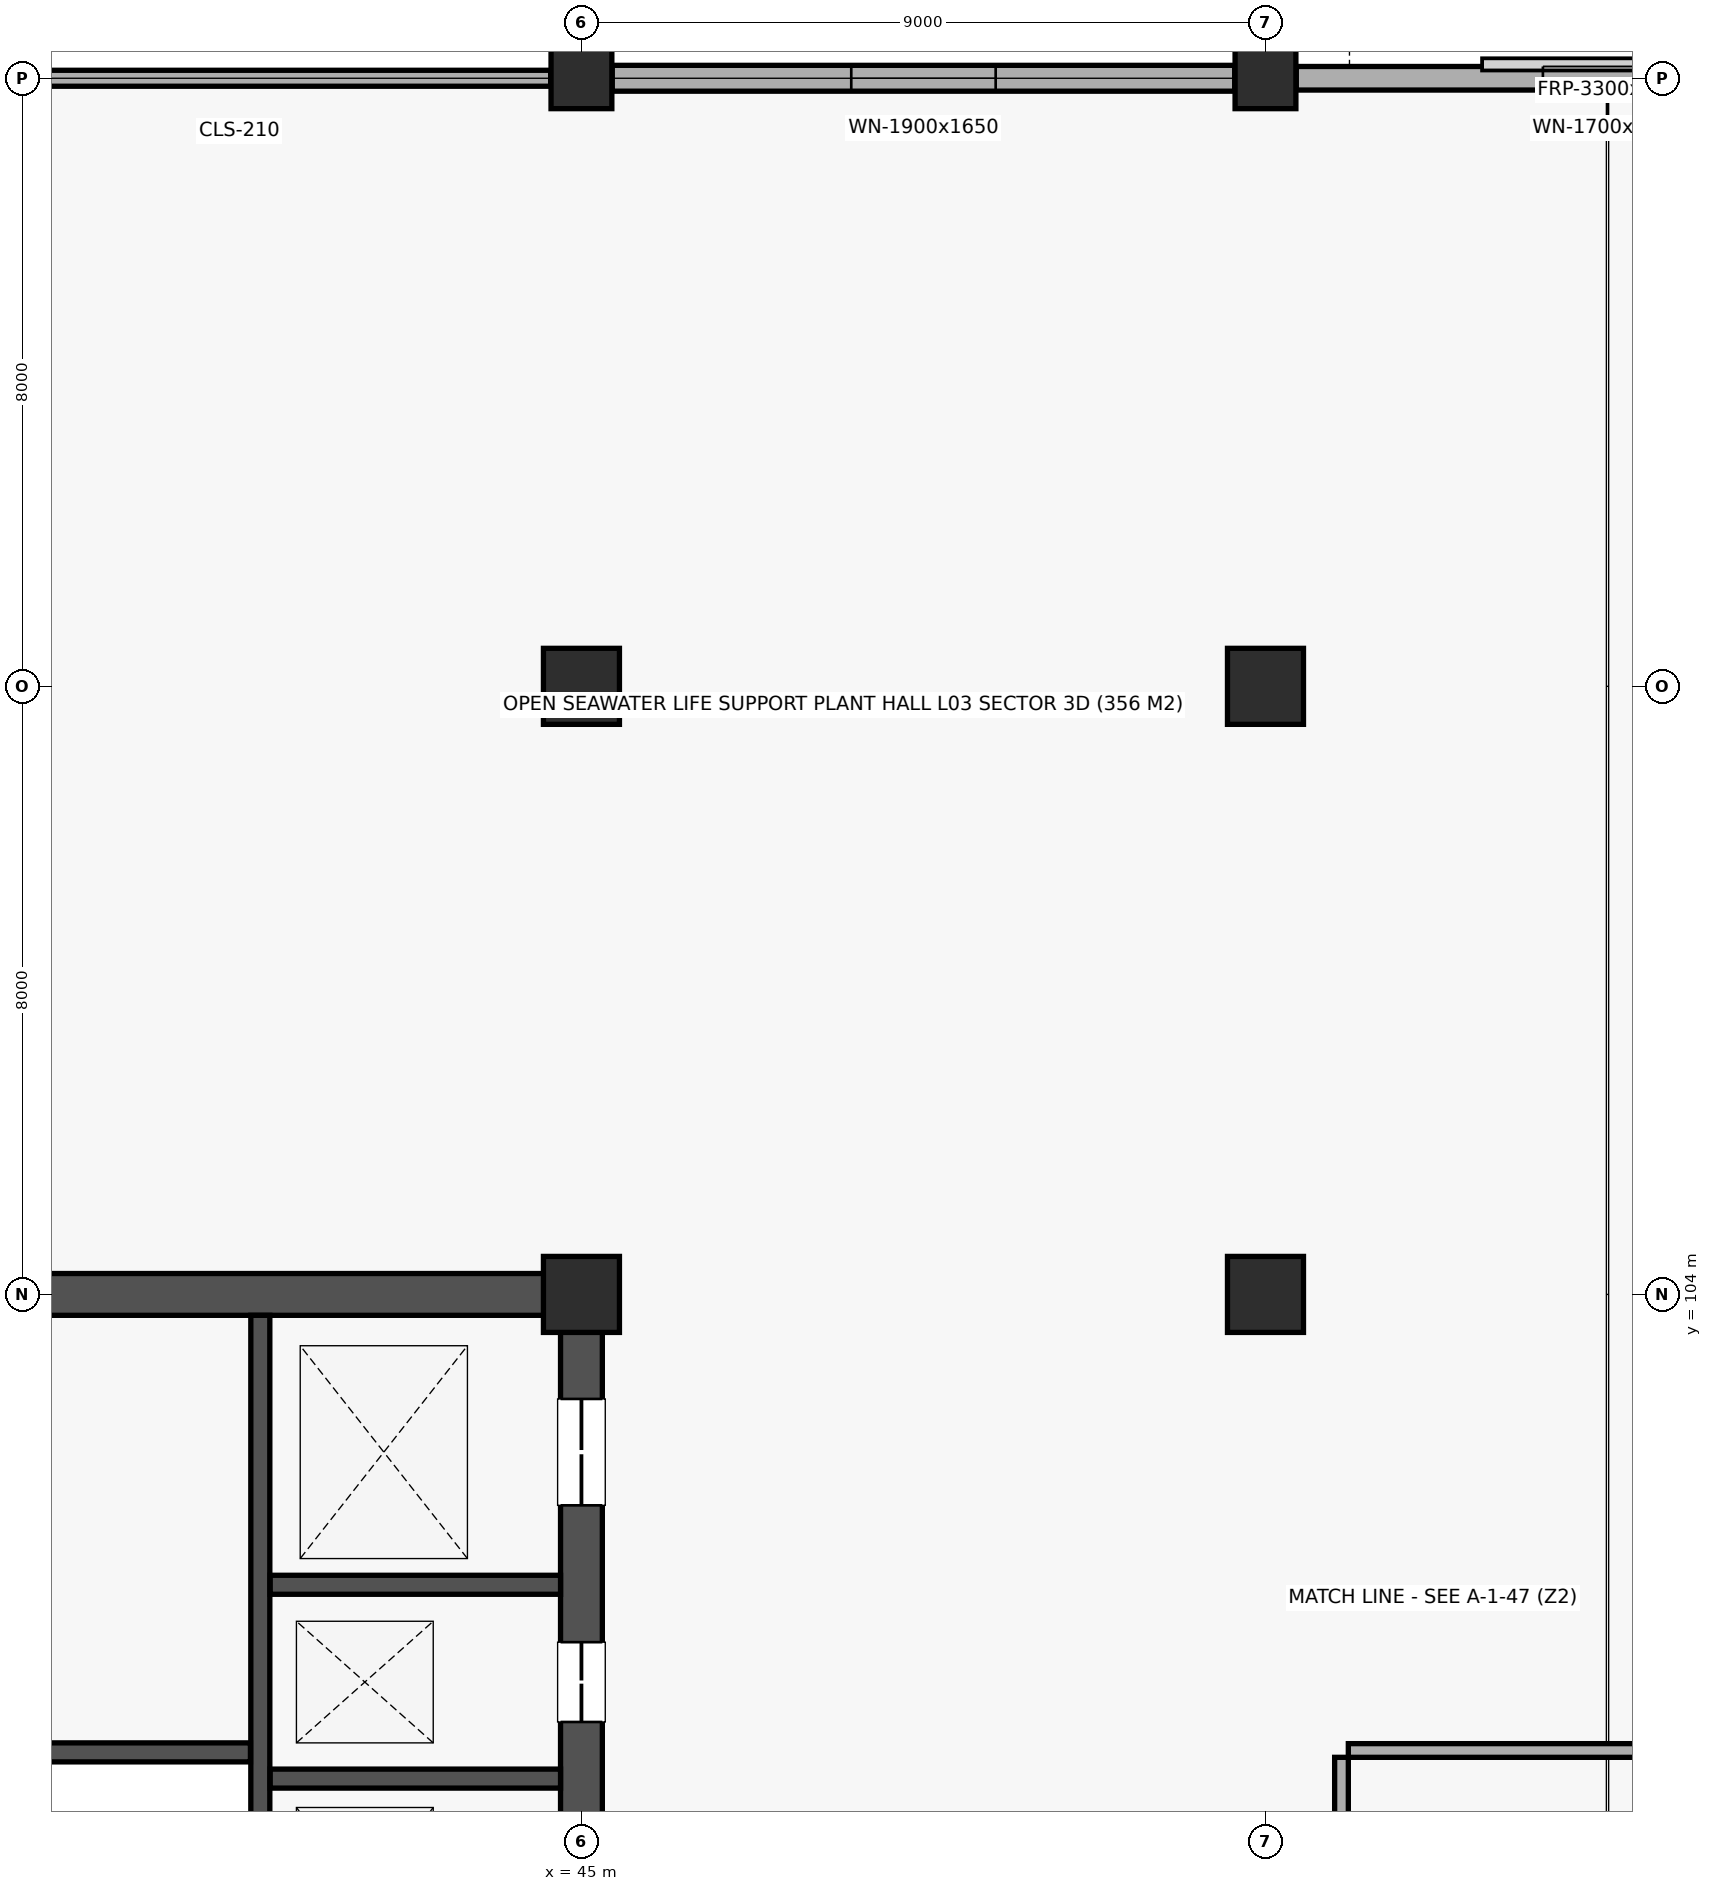
"""IFC4 building model, lengths in metres.
Left out: names, types, materials, properties, quantities, classifications, styles, units other than length and angle.
Written with IfcOpenShell. Run it as: python <this file> out.ifc"""

import sys

from ifc_helpers import new_model, si_unit, direction, frame, frame_2d, origin, origin_2d, place, context, subcontext, project, spatial, rectangle, extrude, element, fill, save


model = new_model("IFC4")
c1 = context("Model", 3, precision=1e-05, world=origin(), true_north=direction((0.0, 1.0)))
c2 = subcontext(c1, "Body", "Model", "MODEL_VIEW")
j1 = project(units=[si_unit("LENGTHUNIT", "METRE"), si_unit("PLANEANGLEUNIT", "RADIAN")], contexts=[c1])
p1 = place(None, origin())
s1 = spatial("IfcSite", under=j1, at=p1, CompositionType="ELEMENT")
p2 = place(p1, origin())
s2 = spatial("IfcBuilding", under=s1, at=p2, CompositionType="ELEMENT")
p3 = place(p2, frame((0.0, 0.0, 13.5)))
s3 = spatial("IfcBuildingStorey", under=s2, at=p3, CompositionType="ELEMENT", Elevation=13.5)
for number, where, z_axis, x_axis in (
    (1, (45.0, 104.0, 0.0), (0.0, 0.0, 1.0), (1.0, 0.0, 0.0)),
    (2, (45.0, 112.0, 0.0), (0.0, 0.0, 1.0), (1.0, 0.0, 0.0)),
):
    element("IfcColumn", number, at=place(p3, frame(where, z_axis=z_axis, x_axis=x_axis)), inside=s3, PredefinedType="COLUMN", context=c2, shape_type="SweptSolid", body=[
        extrude(rectangle(XDim=1.0, YDim=1.0, at=origin_2d()), origin(), (0.0, 0.0, 1.0), 4.5),
    ])
p4 = place(p3, frame((45.0, 120.0, 0.0), z_axis=(0.0, 0.0, 1.0), x_axis=(1.0, 0.0, 0.0)))
e3 = element("IfcColumn", 3, at=p4, inside=s3, PredefinedType="COLUMN", context=c2, shape_type="SweptSolid", body=[
    extrude(rectangle(XDim=0.8, YDim=0.8, at=origin_2d()), origin(), (0.0, 0.0, 1.0), 4.2),
])
for number, where, z_axis, x_axis in (
    (4, (54.0, 104.0, 0.0), (0.0, 0.0, 1.0), (1.0, 0.0, 0.0)),
    (5, (54.0, 112.0, 0.0), (0.0, 0.0, 1.0), (1.0, 0.0, 0.0)),
):
    element("IfcColumn", number, at=place(p3, frame(where, z_axis=z_axis, x_axis=x_axis)), inside=s3, PredefinedType="COLUMN", context=c2, shape_type="SweptSolid", body=[
        extrude(rectangle(XDim=1.0, YDim=1.0, at=origin_2d()), origin(), (0.0, 0.0, 1.0), 4.5),
    ])
p5 = place(p3, frame((54.0, 120.0, 0.0), z_axis=(0.0, 0.0, 1.0), x_axis=(1.0, 0.0, 0.0)))
e6 = element("IfcColumn", 6, at=p5, inside=s3, PredefinedType="COLUMN", context=c2, shape_type="SweptSolid", body=[
    extrude(rectangle(XDim=0.8, YDim=0.8, at=origin_2d()), origin(), (0.0, 0.0, 1.0), 4.2),
])
p6 = place(p3, frame((36.275, 104.0, 0.0), z_axis=(0.0, 0.0, 1.0), x_axis=(1.0, 0.0, 0.0)))
e7 = element("IfcWall", 7, at=p6, inside=s3, PredefinedType="SHEAR", context=c2, shape_type="SweptSolid", body=[
    extrude(rectangle(XDim=8.45, YDim=0.55, at=frame_2d((4.225, 0.0))), origin(), (0.0, 0.0, 1.0), 4.2),
])
p7 = place(p3, frame((45.0, 88.275, 0.0), z_axis=(0.0, 0.0, 1.0), x_axis=(0.0, 1.0, 0.0)))
e8 = element("IfcWall", 8, at=p7, inside=s3, PredefinedType="SHEAR", context=c2, shape_type="SweptSolid", body=[
    extrude(rectangle(XDim=15.45, YDim=0.55, at=frame_2d((7.725, 0.0))), origin(), (0.0, 0.0, 1.0), 4.2),
])
p8 = place(p7, frame((10.1, 0.0, 0.0)))
e9 = element("IfcOpeningElement", 9, at=p8, cuts=e8, PredefinedType="OPENING", context=c2, shape_type="SweptSolid", body=[
    extrude(rectangle(XDim=1.05, YDim=2.12, at=frame_2d((0.525, 1.06))), frame((0.0, 0.287, 0.0), z_axis=(0.0, -1.0, 0.0), x_axis=(1.0, 0.0, 0.0)), (0.0, 0.0, 1.0), 0.574),
])
p9 = place(p7, frame((12.95, 0.0, 0.0)))
e10 = element("IfcOpeningElement", 10, at=p9, cuts=e8, PredefinedType="OPENING", context=c2, shape_type="SweptSolid", body=[
    extrude(rectangle(XDim=1.4, YDim=2.2, at=frame_2d((0.7, 1.1))), frame((0.0, 0.287, 0.0), z_axis=(0.0, -1.0, 0.0), x_axis=(1.0, 0.0, 0.0)), (0.0, 0.0, 1.0), 0.574),
])
p10 = place(p3, frame((40.775, 88.275, 0.0), z_axis=(0.0, 0.0, 1.0), x_axis=(0.0, 1.0, 0.0)))
e11 = element("IfcWall", 11, at=p10, inside=s3, PredefinedType="SOLIDWALL", context=c2, shape_type="SweptSolid", body=[
    extrude(rectangle(XDim=15.45, YDim=0.25, at=frame_2d((7.725, 0.0))), origin(), (0.0, 0.0, 1.0), 4.2),
])
p11 = place(p10, frame((0.45, 0.0, 0.0)))
e12 = element("IfcOpeningElement", 12, at=p11, cuts=e11, PredefinedType="OPENING", context=c2, shape_type="SweptSolid", body=[
    extrude(rectangle(XDim=1.1, YDim=2.15, at=frame_2d((0.55, 1.075))), frame((0.0, 0.137, 0.0), z_axis=(0.0, -1.0, 0.0), x_axis=(1.0, 0.0, 0.0)), (0.0, 0.0, 1.0), 0.274),
])
p12 = place(p3, frame((36.275, 97.975, 0.0), z_axis=(0.0, 0.0, 1.0), x_axis=(1.0, 0.0, 0.0)))
e13 = element("IfcWall", 13, at=p12, inside=s3, PredefinedType="SOLIDWALL", context=c2, shape_type="SweptSolid", body=[
    extrude(rectangle(XDim=4.37, YDim=0.25, at=frame_2d((2.185, 0.0))), origin(), (0.0, 0.0, 1.0), 4.2),
])
for number, where, z_axis, x_axis in (
    (14, (40.905, 97.63, 0.0), (0.0, 0.0, 1.0), (1.0, 0.0, 0.0)),
    (15, (40.905, 100.18, 0.0), (0.0, 0.0, 1.0), (1.0, 0.0, 0.0)),
):
    element("IfcWall", number, at=place(p3, frame(where, z_axis=z_axis, x_axis=x_axis)), inside=s3, PredefinedType="SOLIDWALL", context=c2, shape_type="SweptSolid", body=[
        extrude(rectangle(XDim=3.82, YDim=0.25, at=frame_2d((1.91, 0.0))), origin(), (0.0, 0.0, 1.0), 4.2),
    ])
p13 = place(p3, frame((36.405, 120.0, 0.0), z_axis=(0.0, 0.0, 1.0), x_axis=(1.0, 0.0, 0.0)))
e16 = element("IfcWall", 16, at=p13, inside=s3, PredefinedType="ELEMENTEDWALL", context=c2, shape_type="SweptSolid", body=[
    extrude(rectangle(XDim=8.19, YDim=0.21, at=frame_2d((4.095, 0.0))), origin(), (0.0, 0.0, 1.0), 3.48),
])
p14 = place(p3, frame((45.405, 120.0, 0.0), z_axis=(0.0, 0.0, 1.0), x_axis=(1.0, 0.0, 0.0)))
e17 = element("IfcWall", 17, at=p14, inside=s3, PredefinedType="STANDARD", context=c2, shape_type="SweptSolid", body=[
    extrude(rectangle(XDim=8.19, YDim=0.34, at=frame_2d((4.095, 0.0))), origin(), (0.0, 0.0, 1.0), 3.48),
])
p15 = place(p14, frame((3.145, 0.0, 0.85)))
e18 = element("IfcOpeningElement", 18, at=p15, cuts=e17, PredefinedType="OPENING", context=c2, shape_type="SweptSolid", body=[
    extrude(rectangle(XDim=1.9, YDim=1.65, at=frame_2d((0.95, 0.825))), frame((0.0, 0.182, 0.0), z_axis=(0.0, -1.0, 0.0), x_axis=(1.0, 0.0, 0.0)), (0.0, 0.0, 1.0), 0.364),
])
p16 = place(p3, frame((54.405, 120.0, 0.0), z_axis=(0.0, 0.0, 1.0), x_axis=(1.0, 0.0, 0.0)))
e19 = element("IfcWall", 19, at=p16, inside=s3, PredefinedType="STANDARD", context=c2, shape_type="SweptSolid", body=[
    extrude(rectangle(XDim=8.19, YDim=0.31, at=frame_2d((4.095, 0.0))), origin(), (0.0, 0.0, 1.0), 3.48),
])
p17 = place(p16, frame((3.245, 0.0, 0.85)))
e20 = element("IfcOpeningElement", 20, at=p17, cuts=e19, PredefinedType="OPENING", context=c2, shape_type="SweptSolid", body=[
    extrude(rectangle(XDim=1.7, YDim=1.65, at=frame_2d((0.85, 0.825))), frame((0.0, 0.167, 0.0), z_axis=(0.0, -1.0, 0.0), x_axis=(1.0, 0.0, 0.0)), (0.0, 0.0, 1.0), 0.334),
])
p18 = place(p3, frame((55.09, 98.0, 0.0), z_axis=(0.0, 0.0, 1.0), x_axis=(1.0, 0.0, 0.0)))
e21 = element("IfcWall", 21, at=p18, inside=s3, PredefinedType="PARTITIONING", context=c2, shape_type="SweptSolid", body=[
    extrude(rectangle(XDim=22.82, YDim=0.18, at=frame_2d((11.41, 0.0))), origin(), (0.0, 0.0, 1.0), 4.2),
])
p19 = place(p3, frame((55.0, 82.09, 0.0), z_axis=(0.0, 0.0, 1.0), x_axis=(0.0, 1.0, 0.0)))
e22 = element("IfcWall", 22, at=p19, inside=s3, PredefinedType="PARTITIONING", context=c2, shape_type="SweptSolid", body=[
    extrude(rectangle(XDim=15.82, YDim=0.18, at=frame_2d((7.91, 0.0))), origin(), (0.0, 0.0, 1.0), 4.2),
])
p20 = place(p8, origin())
e23 = element("IfcDoor", 23, at=p20, inside=s3, OperationType="DOUBLE_DOOR_SLIDING", PredefinedType="DOOR", context=c2, shape_type="SweptSolid", body=[
    extrude(rectangle(XDim=1.05, YDim=2.12, at=frame_2d((0.525, 1.06))), frame((0.0, 0.025, 0.0), z_axis=(0.0, -1.0, 0.0), x_axis=(1.0, 0.0, 0.0)), (0.0, 0.0, 1.0), 0.05),
])
fill(e9, e23)
p21 = place(p9, origin())
e24 = element("IfcDoor", 24, at=p21, inside=s3, OperationType="DOUBLE_DOOR_SLIDING", PredefinedType="DOOR", context=c2, shape_type="SweptSolid", body=[
    extrude(rectangle(XDim=1.4, YDim=2.2, at=frame_2d((0.7, 1.1))), frame((0.0, 0.025, 0.0), z_axis=(0.0, -1.0, 0.0), x_axis=(1.0, 0.0, 0.0)), (0.0, 0.0, 1.0), 0.05),
])
fill(e10, e24)
p22 = place(p15, origin())
e25 = element("IfcWindow", 25, at=p22, inside=s3, PartitioningType="SINGLE_PANEL", PredefinedType="WINDOW", context=c2, shape_type="SweptSolid", body=[
    extrude(rectangle(XDim=1.9, YDim=1.65, at=frame_2d((0.95, 0.825))), frame((0.0, 0.03, 0.0), z_axis=(0.0, -1.0, 0.0), x_axis=(1.0, 0.0, 0.0)), (0.0, 0.0, 1.0), 0.06),
])
fill(e18, e25)
p23 = place(p17, origin())
e26 = element("IfcWindow", 26, at=p23, inside=s3, PartitioningType="SINGLE_PANEL", PredefinedType="WINDOW", context=c2, shape_type="SweptSolid", body=[
    extrude(rectangle(XDim=1.7, YDim=1.65, at=frame_2d((0.85, 0.825))), frame((0.0, 0.03, 0.0), z_axis=(0.0, -1.0, 0.0), x_axis=(1.0, 0.0, 0.0)), (0.0, 0.0, 1.0), 0.06),
])
fill(e20, e26)
save(model, sys.argv[1])
